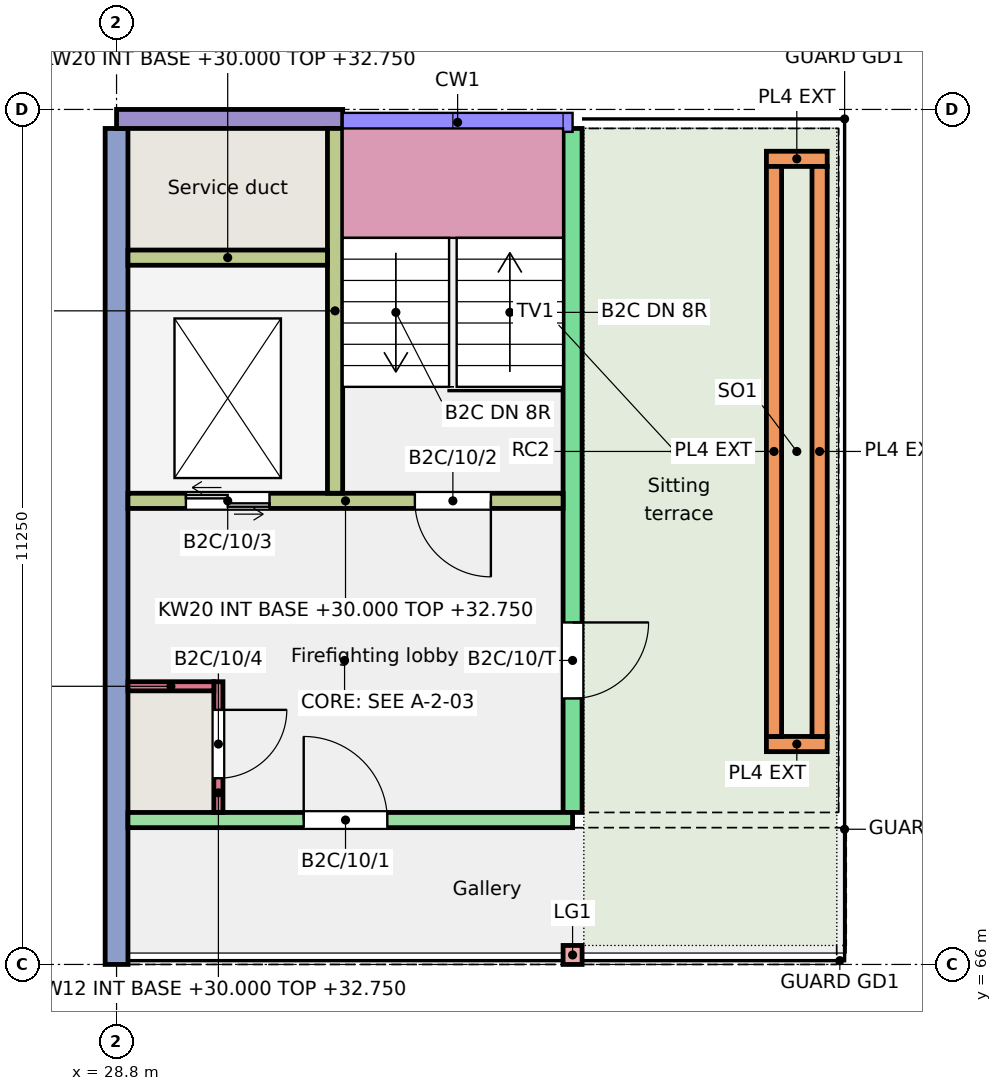
"""IFC4 building model, lengths in metres.
Left out: names, types, materials, properties, quantities, classifications, styles, units other than length and angle.
Written with IfcOpenShell. Run it as: python <this file> out.ifc"""

import sys

from ifc_helpers import new_model, si_unit, direction, frame, frame_2d, origin, origin_2d, place, context, subcontext, project, spatial, rectangle, extrude, element, fill, save


model = new_model("IFC4")
c1 = context("Model", 3, precision=1e-05, world=origin(), true_north=direction((0.0, 1.0)))
c2 = subcontext(c1, "Body", "Model", "MODEL_VIEW")
j1 = project(units=[si_unit("LENGTHUNIT", "METRE"), si_unit("PLANEANGLEUNIT", "RADIAN")], contexts=[c1])
p1 = place(None, origin())
s1 = spatial("IfcSite", under=j1, at=p1, CompositionType="ELEMENT")
p2 = place(p1, origin())
s2 = spatial("IfcBuilding", under=s1, at=p2, CompositionType="ELEMENT")
p3 = place(p2, frame((0.0, 0.0, 30.0)))
s3 = spatial("IfcBuildingStorey", under=s2, at=p3, CompositionType="ELEMENT", Elevation=30.0)
p4 = place(p3, frame((28.8, 66.0, 0.0), z_axis=(0.0, 0.0, 1.0), x_axis=(0.0, 1.0, 0.0)))
e1 = element("IfcWall", 1, at=p4, inside=s3, PredefinedType="SHEAR", context=c2, shape_type="SweptSolid", body=[
    extrude(rectangle(XDim=11.0, YDim=0.3, at=frame_2d((5.5, 0.0))), origin(), (0.0, 0.0, 1.0), 3.0),
])
p5 = place(p3, frame((34.8, 68.0, 0.0), z_axis=(0.0, 0.0, 1.0), x_axis=(0.0, 1.0, 0.0)))
e2 = element("IfcWall", 2, at=p5, inside=s3, PredefinedType="SHEAR", context=c2, shape_type="SweptSolid", body=[
    extrude(rectangle(XDim=9.0, YDim=0.25, at=frame_2d((4.5, 0.0))), origin(), (0.0, 0.0, 1.0), 3.0),
])
p6 = place(p5, frame((1.5, 0.0, 0.0)))
e3 = element("IfcOpeningElement", 3, at=p6, cuts=e2, PredefinedType="OPENING", context=c2, shape_type="SweptSolid", body=[
    extrude(rectangle(XDim=1.0, YDim=2.1, at=frame_2d((0.5, 1.05))), frame((0.0, 0.135, 0.0), z_axis=(0.0, -1.0, 0.0), x_axis=(1.0, 0.0, 0.0)), (0.0, 0.0, 1.0), 0.27),
])
p7 = place(p3, frame((28.8, 77.125, 0.0), z_axis=(0.0, 0.0, 1.0), x_axis=(1.0, 0.0, 0.0)))
e4 = element("IfcWall", 4, at=p7, inside=s3, PredefinedType="SOLIDWALL", context=c2, shape_type="SweptSolid", body=[
    extrude(rectangle(XDim=2.975, YDim=0.25, at=frame_2d((1.487, 0.0))), origin(), (0.0, 0.0, 1.0), 3.0),
])
p8 = place(p3, frame((28.95, 67.9, 0.0), z_axis=(0.0, 0.0, 1.0), x_axis=(1.0, 0.0, 0.0)))
e5 = element("IfcWall", 5, at=p8, inside=s3, PredefinedType="SHEAR", context=c2, shape_type="SweptSolid", body=[
    extrude(rectangle(XDim=5.85, YDim=0.2, at=frame_2d((2.925, 0.0))), origin(), (0.0, 0.0, 1.0), 2.75),
])
p9 = place(p8, frame((2.312, 0.0, 0.0)))
e6 = element("IfcOpeningElement", 6, at=p9, cuts=e5, PredefinedType="OPENING", context=c2, shape_type="SweptSolid", body=[
    extrude(rectangle(XDim=1.1, YDim=2.1, at=frame_2d((0.55, 1.05))), frame((0.0, 0.11, 0.0), z_axis=(0.0, -1.0, 0.0), x_axis=(1.0, 0.0, 0.0)), (0.0, 0.0, 1.0), 0.22),
])
p10 = place(p3, frame((28.95, 72.1, 0.0), z_axis=(0.0, 0.0, 1.0), x_axis=(1.0, 0.0, 0.0)))
e7 = element("IfcWall", 7, at=p10, inside=s3, PredefinedType="SHEAR", context=c2, shape_type="SweptSolid", body=[
    extrude(rectangle(XDim=5.725, YDim=0.2, at=frame_2d((2.863, 0.0))), origin(), (0.0, 0.0, 1.0), 2.75),
])
p11 = place(p10, frame((3.775, 0.0, 0.0)))
e8 = element("IfcOpeningElement", 8, at=p11, cuts=e7, PredefinedType="OPENING", context=c2, shape_type="SweptSolid", body=[
    extrude(rectangle(XDim=1.0, YDim=2.1, at=frame_2d((0.5, 1.05))), frame((0.0, 0.11, 0.0), z_axis=(0.0, -1.0, 0.0), x_axis=(1.0, 0.0, 0.0)), (0.0, 0.0, 1.0), 0.22),
])
p12 = place(p10, frame((0.762, 0.0, 0.0)))
e9 = element("IfcOpeningElement", 9, at=p12, cuts=e7, PredefinedType="OPENING", context=c2, shape_type="SweptSolid", body=[
    extrude(rectangle(XDim=1.1, YDim=2.1, at=frame_2d((0.55, 1.05))), frame((0.0, 0.11, 0.0), z_axis=(0.0, -1.0, 0.0), x_axis=(1.0, 0.0, 0.0)), (0.0, 0.0, 1.0), 0.22),
])
p13 = place(p3, frame((31.675, 72.2, 0.0), z_axis=(0.0, 0.0, 1.0), x_axis=(0.0, 1.0, 0.0)))
e10 = element("IfcWall", 10, at=p13, inside=s3, PredefinedType="SHEAR", context=c2, shape_type="SweptSolid", body=[
    extrude(rectangle(XDim=4.8, YDim=0.2, at=frame_2d((2.4, 0.0))), origin(), (0.0, 0.0, 1.0), 2.75),
])
p14 = place(p3, frame((28.95, 75.3, 0.0), z_axis=(0.0, 0.0, 1.0), x_axis=(1.0, 0.0, 0.0)))
e11 = element("IfcWall", 11, at=p14, inside=s3, PredefinedType="SHEAR", context=c2, shape_type="SweptSolid", body=[
    extrude(rectangle(XDim=2.625, YDim=0.2, at=frame_2d((1.312, 0.0))), origin(), (0.0, 0.0, 1.0), 2.75),
])
p15 = place(p3, frame((30.14, 68.0, 0.0), z_axis=(0.0, 0.0, 1.0), x_axis=(0.0, 1.0, 0.0)))
e12 = element("IfcWall", 12, at=p15, inside=s3, PredefinedType="SHEAR", context=c2, shape_type="SweptSolid", body=[
    extrude(rectangle(XDim=1.72, YDim=0.12, at=frame_2d((0.86, 0.0))), origin(), (0.0, 0.0, 1.0), 2.75),
])
p16 = place(p15, frame((0.45, 0.0, 0.0)))
e13 = element("IfcOpeningElement", 13, at=p16, cuts=e12, PredefinedType="OPENING", context=c2, shape_type="SweptSolid", body=[
    extrude(rectangle(XDim=0.9, YDim=2.1, at=frame_2d((0.45, 1.05))), frame((0.0, 0.07, 0.0), z_axis=(0.0, -1.0, 0.0), x_axis=(1.0, 0.0, 0.0)), (0.0, 0.0, 1.0), 0.14),
])
p17 = place(p3, frame((28.95, 69.66, 0.0), z_axis=(0.0, 0.0, 1.0), x_axis=(1.0, 0.0, 0.0)))
e14 = element("IfcWall", 14, at=p17, inside=s3, PredefinedType="SHEAR", context=c2, shape_type="SweptSolid", body=[
    extrude(rectangle(XDim=1.13, YDim=0.12, at=frame_2d((0.565, 0.0))), origin(), (0.0, 0.0, 1.0), 2.75),
])
p18 = place(p3, frame((34.8, 66.125, 0.0), z_axis=(0.0, 0.0, 1.0), x_axis=(1.0, 0.0, 0.0)))
e15 = element("IfcColumn", 15, at=p18, inside=s3, PredefinedType="COLUMN", context=c2, shape_type="SweptSolid", body=[
    extrude(rectangle(XDim=0.25, YDim=0.25, at=origin_2d()), origin(), (0.0, 0.0, 1.0), 3.0),
])
for number, where, z_axis, x_axis in (
    (16, (37.35, 68.9, 0.01), (0.0, 0.0, 1.0), (1.0, 0.0, 0.0)),
    (17, (37.35, 76.6, 0.01), (0.0, 0.0, 1.0), (1.0, 0.0, 0.0)),
):
    element("IfcWall", number, at=place(p3, frame(where, z_axis=z_axis, x_axis=x_axis)), inside=s3, PredefinedType="SOLIDWALL", context=c2, shape_type="SweptSolid", body=[
        extrude(rectangle(XDim=0.8, YDim=0.2, at=frame_2d((0.4, 0.0))), origin(), (0.0, 0.0, 1.0), 0.45),
    ])
for number, where, z_axis, x_axis in (
    (18, (37.45, 69.0, 0.01), (0.0, 0.0, 1.0), (0.0, 1.0, 0.0)),
    (19, (38.05, 69.0, 0.01), (0.0, 0.0, 1.0), (0.0, 1.0, 0.0)),
):
    element("IfcWall", number, at=place(p3, frame(where, z_axis=z_axis, x_axis=x_axis)), inside=s3, PredefinedType="SOLIDWALL", context=c2, shape_type="SweptSolid", body=[
        extrude(rectangle(XDim=7.5, YDim=0.2, at=frame_2d((3.75, 0.0))), origin(), (0.0, 0.0, 1.0), 0.45),
    ])
p19 = place(p9, origin())
e20 = element("IfcDoor", 20, at=p19, inside=s3, OperationType="SINGLE_SWING_LEFT", PredefinedType="DOOR", context=c2, shape_type="SweptSolid", body=[
    extrude(rectangle(XDim=1.1, YDim=2.1, at=frame_2d((0.55, 1.05))), frame((0.0, 0.025, 0.0), z_axis=(0.0, -1.0, 0.0), x_axis=(1.0, 0.0, 0.0)), (0.0, 0.0, 1.0), 0.05),
])
fill(e6, e20)
p20 = place(p11, origin())
e21 = element("IfcDoor", 21, at=p20, inside=s3, OperationType="SINGLE_SWING_RIGHT", PredefinedType="DOOR", context=c2, shape_type="SweptSolid", body=[
    extrude(rectangle(XDim=1.0, YDim=2.1, at=frame_2d((0.5, 1.05))), frame((0.0, 0.025, 0.0), z_axis=(0.0, -1.0, 0.0), x_axis=(1.0, 0.0, 0.0)), (0.0, 0.0, 1.0), 0.05),
])
fill(e8, e21)
p21 = place(p12, origin())
e22 = element("IfcDoor", 22, at=p21, inside=s3, OperationType="DOUBLE_DOOR_SLIDING", PredefinedType="DOOR", context=c2, shape_type="SweptSolid", body=[
    extrude(rectangle(XDim=1.1, YDim=2.1, at=frame_2d((0.55, 1.05))), frame((0.0, 0.025, 0.0), z_axis=(0.0, -1.0, 0.0), x_axis=(1.0, 0.0, 0.0)), (0.0, 0.0, 1.0), 0.05),
])
fill(e9, e22)
p22 = place(p16, origin())
e23 = element("IfcDoor", 23, at=p22, inside=s3, OperationType="SINGLE_SWING_RIGHT", PredefinedType="DOOR", context=c2, shape_type="SweptSolid", body=[
    extrude(rectangle(XDim=0.9, YDim=2.1, at=frame_2d((0.45, 1.05))), frame((0.0, 0.025, 0.0), z_axis=(0.0, -1.0, 0.0), x_axis=(1.0, 0.0, 0.0)), (0.0, 0.0, 1.0), 0.05),
])
fill(e13, e23)
p23 = place(p6, origin())
e24 = element("IfcDoor", 24, at=p23, inside=s3, OperationType="SINGLE_SWING_RIGHT", PredefinedType="DOOR", context=c2, shape_type="SweptSolid", body=[
    extrude(rectangle(XDim=1.0, YDim=2.1, at=frame_2d((0.5, 1.05))), frame((0.0, 0.025, 0.0), z_axis=(0.0, -1.0, 0.0), x_axis=(1.0, 0.0, 0.0)), (0.0, 0.0, 1.0), 0.05),
])
fill(e3, e24)
save(model, sys.argv[1])
